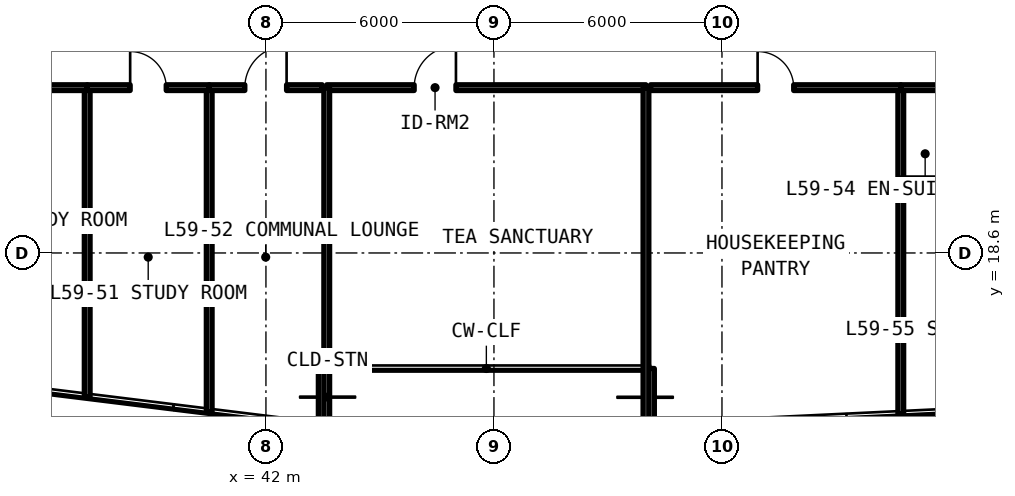
"""IFC4 building model, lengths in metres.
Left out: names, types, materials, properties, quantities, classifications, styles, units other than length and angle.
Written with IfcOpenShell. Run it as: python <this file> out.ifc"""

import sys

from ifc_helpers import new_model, si_unit, direction, frame, frame_2d, origin, place, context, subcontext, project, spatial, rectangle, extrude, element, fill, save


model = new_model("IFC4")
c1 = context("Model", 3, precision=1e-05, world=origin(), true_north=direction((0.0, 1.0)))
c2 = subcontext(c1, "Body", "Model", "MODEL_VIEW")
j1 = project(units=[si_unit("LENGTHUNIT", "METRE"), si_unit("PLANEANGLEUNIT", "RADIAN")], contexts=[c1])
p1 = place(None, origin())
s1 = spatial("IfcSite", under=j1, at=p1, CompositionType="ELEMENT")
p2 = place(p1, origin())
s2 = spatial("IfcBuilding", under=s1, at=p2, CompositionType="ELEMENT")
p3 = place(p2, frame((0.0, 0.0, 211.86)))
s3 = spatial("IfcBuildingStorey", under=s2, at=p3, CompositionType="ELEMENT", Elevation=211.86)
p4 = place(p3, frame((43.49, 14.054, 0.0), z_axis=(0.0, 0.0, 1.0), x_axis=(0.0, 1.0, 0.0)))
e1 = element("IfcWall", 1, at=p4, inside=s3, PredefinedType="SOLIDWALL", context=c2, shape_type="SweptSolid", body=[
    extrude(rectangle(XDim=1.506, YDim=0.22, at=frame_2d((0.753, 0.0))), origin(), (0.0, 0.0, 1.0), 3.41),
])
p5 = place(p3, frame((52.11, 15.56, 0.0), z_axis=(0.0, 0.0, 1.0), x_axis=(0.0, -1.0, 0.0)))
e2 = element("IfcWall", 2, at=p5, inside=s3, PredefinedType="SOLIDWALL", context=c2, shape_type="SweptSolid", body=[
    extrude(rectangle(XDim=1.515, YDim=0.22, at=frame_2d((0.757, 0.0))), origin(), (0.0, 0.0, 1.0), 3.41),
])
p6 = place(p3, frame((43.6, 22.95, 0.0), z_axis=(0.0, 0.0, 1.0), x_axis=(1.0, 0.0, 0.0)))
e3 = element("IfcWall", 3, at=p6, inside=s3, PredefinedType="SOLIDWALL", context=c2, shape_type="SweptSolid", body=[
    extrude(rectangle(XDim=8.4, YDim=0.15, at=frame_2d((4.2, 0.0))), origin(), (0.0, 0.0, 1.0), 2.63),
])
p7 = place(p6, frame((2.3, 0.0, 0.0)))
e4 = element("IfcOpeningElement", 4, at=p7, cuts=e3, PredefinedType="OPENING", context=c2, shape_type="SweptSolid", body=[
    extrude(rectangle(XDim=1.1, YDim=2.15, at=frame_2d((0.55, 1.075))), frame((0.0, 0.085, 0.0), z_axis=(0.0, -1.0, 0.0), x_axis=(1.0, 0.0, 0.0)), (0.0, 0.0, 1.0), 0.17),
])
p8 = place(p3, frame((43.6, 14.056, 0.0), z_axis=(0.0, 0.0, 1.0), x_axis=(0.0, 1.0, 0.0)))
e5 = element("IfcWall", 5, at=p8, inside=s3, PredefinedType="SOLIDWALL", context=c2, shape_type="SweptSolid", body=[
    extrude(rectangle(XDim=8.894, YDim=0.15, at=frame_2d((4.447, 0.0))), origin(), (0.0, 0.0, 1.0), 2.63),
])
p9 = place(p3, frame((52.0, 14.046, 0.0), z_axis=(0.0, 0.0, 1.0), x_axis=(0.0, 1.0, 0.0)))
e6 = element("IfcWall", 6, at=p9, inside=s3, PredefinedType="SOLIDWALL", context=c2, shape_type="SweptSolid", body=[
    extrude(rectangle(XDim=8.904, YDim=0.15, at=frame_2d((4.452, 0.0))), origin(), (0.0, 0.0, 1.0), 2.63),
])
p10 = place(p3, frame((37.297, 14.819, 0.0), z_axis=(0.0, 0.0, 1.0), x_axis=(0.0, 1.0, 0.0)))
e7 = element("IfcWall", 7, at=p10, inside=s3, PredefinedType="SOLIDWALL", context=c2, shape_type="SweptSolid", body=[
    extrude(rectangle(XDim=8.131, YDim=0.15, at=frame_2d((4.065, 0.0))), origin(), (0.0, 0.0, 1.0), 2.63),
])
p11 = place(p3, frame((34.205, 22.95, 0.0), z_axis=(0.0, 0.0, 1.0), x_axis=(1.0, 0.0, 0.0)))
e8 = element("IfcWall", 8, at=p11, inside=s3, PredefinedType="SOLIDWALL", context=c2, shape_type="SweptSolid", body=[
    extrude(rectangle(XDim=3.092, YDim=0.15, at=frame_2d((1.546, 0.0))), origin(), (0.0, 0.0, 1.0), 2.63),
])
p12 = place(p11, frame((1.071, 0.0, 0.0)))
e9 = element("IfcOpeningElement", 9, at=p12, cuts=e8, PredefinedType="OPENING", context=c2, shape_type="SweptSolid", body=[
    extrude(rectangle(XDim=0.95, YDim=2.15, at=frame_2d((0.475, 1.075))), frame((0.0, 0.085, 0.0), z_axis=(0.0, -1.0, 0.0), x_axis=(1.0, 0.0, 0.0)), (0.0, 0.0, 1.0), 0.17),
])
p13 = place(p3, frame((40.507, 14.423, 0.0), z_axis=(0.0, 0.0, 1.0), x_axis=(0.0, 1.0, 0.0)))
e10 = element("IfcWall", 10, at=p13, inside=s3, PredefinedType="SOLIDWALL", context=c2, shape_type="SweptSolid", body=[
    extrude(rectangle(XDim=8.527, YDim=0.15, at=frame_2d((4.264, 0.0))), origin(), (0.0, 0.0, 1.0), 2.63),
])
p14 = place(p3, frame((37.297, 22.95, 0.0), z_axis=(0.0, 0.0, 1.0), x_axis=(1.0, 0.0, 0.0)))
e11 = element("IfcWall", 11, at=p14, inside=s3, PredefinedType="SOLIDWALL", context=c2, shape_type="SweptSolid", body=[
    extrude(rectangle(XDim=3.21, YDim=0.15, at=frame_2d((1.605, 0.0))), origin(), (0.0, 0.0, 1.0), 2.63),
])
p15 = place(p14, frame((1.13, 0.0, 0.0)))
e12 = element("IfcOpeningElement", 12, at=p15, cuts=e11, PredefinedType="OPENING", context=c2, shape_type="SweptSolid", body=[
    extrude(rectangle(XDim=0.95, YDim=2.15, at=frame_2d((0.475, 1.075))), frame((0.0, 0.085, 0.0), z_axis=(0.0, -1.0, 0.0), x_axis=(1.0, 0.0, 0.0)), (0.0, 0.0, 1.0), 0.17),
])
p16 = place(p3, frame((40.507, 22.95, 0.0), z_axis=(0.0, 0.0, 1.0), x_axis=(1.0, 0.0, 0.0)))
e13 = element("IfcWall", 13, at=p16, inside=s3, PredefinedType="SOLIDWALL", context=c2, shape_type="SweptSolid", body=[
    extrude(rectangle(XDim=2.973, YDim=0.15, at=frame_2d((1.486, 0.0))), origin(), (0.0, 0.0, 1.0), 2.63),
])
p17 = place(p16, frame((0.936, 0.0, 0.0)))
e14 = element("IfcOpeningElement", 14, at=p17, cuts=e13, PredefinedType="OPENING", context=c2, shape_type="SweptSolid", body=[
    extrude(rectangle(XDim=1.1, YDim=2.15, at=frame_2d((0.55, 1.075))), frame((0.0, 0.085, 0.0), z_axis=(0.0, -1.0, 0.0), x_axis=(1.0, 0.0, 0.0)), (0.0, 0.0, 1.0), 0.17),
])
p18 = place(p3, frame((58.706, 14.361, 0.0), z_axis=(0.0, 0.0, 1.0), x_axis=(0.0, 1.0, 0.0)))
e15 = element("IfcWall", 15, at=p18, inside=s3, PredefinedType="SOLIDWALL", context=c2, shape_type="SweptSolid", body=[
    extrude(rectangle(XDim=8.589, YDim=0.15, at=frame_2d((4.294, 0.0))), origin(), (0.0, 0.0, 1.0), 2.63),
])
p19 = place(p3, frame((52.12, 22.95, 0.0), z_axis=(0.0, 0.0, 1.0), x_axis=(1.0, 0.0, 0.0)))
e16 = element("IfcWall", 16, at=p19, inside=s3, PredefinedType="SOLIDWALL", context=c2, shape_type="SweptSolid", body=[
    extrude(rectangle(XDim=6.585, YDim=0.15, at=frame_2d((3.293, 0.0))), origin(), (0.0, 0.0, 1.0), 2.63),
])
p20 = place(p19, frame((2.818, 0.0, 0.0)))
e17 = element("IfcOpeningElement", 17, at=p20, cuts=e16, PredefinedType="OPENING", context=c2, shape_type="SweptSolid", body=[
    extrude(rectangle(XDim=0.95, YDim=2.15, at=frame_2d((0.475, 1.075))), frame((0.0, 0.085, 0.0), z_axis=(0.0, -1.0, 0.0), x_axis=(1.0, 0.0, 0.0)), (0.0, 0.0, 1.0), 0.17),
])
p21 = place(p3, frame((58.706, 20.5, 0.0), z_axis=(0.0, 0.0, 1.0), x_axis=(1.0, 0.0, 0.0)))
e18 = element("IfcWall", 18, at=p21, inside=s3, PredefinedType="PARTITIONING", context=c2, shape_type="SweptSolid", body=[
    extrude(rectangle(XDim=2.35, YDim=0.15, at=frame_2d((1.175, 0.0))), origin(), (0.0, 0.0, 1.0), 2.63),
])
p22 = place(p3, frame((58.706, 22.95, 0.0), z_axis=(0.0, 0.0, 1.0), x_axis=(1.0, 0.0, 0.0)))
e19 = element("IfcWall", 19, at=p22, inside=s3, PredefinedType="SOLIDWALL", context=c2, shape_type="SweptSolid", body=[
    extrude(rectangle(XDim=7.409, YDim=0.15, at=frame_2d((3.704, 0.0))), origin(), (0.0, 0.0, 1.0), 2.63),
])
p23 = place(p22, frame((4.444, 0.0, 0.0)))
e20 = element("IfcOpeningElement", 20, at=p23, cuts=e19, PredefinedType="OPENING", context=c2, shape_type="SweptSolid", body=[
    extrude(rectangle(XDim=0.95, YDim=2.15, at=frame_2d((0.475, 1.075))), frame((0.0, 0.085, 0.0), z_axis=(0.0, -1.0, 0.0), x_axis=(1.0, 0.0, 0.0)), (0.0, 0.0, 1.0), 0.17),
])
p24 = place(p7, origin())
e21 = element("IfcDoor", 21, at=p24, inside=s3, OperationType="SINGLE_SWING_RIGHT", PredefinedType="DOOR", context=c2, shape_type="SweptSolid", body=[
    extrude(rectangle(XDim=1.1, YDim=2.15, at=frame_2d((0.55, 1.075))), frame((0.0, 0.025, 0.0), z_axis=(0.0, -1.0, 0.0), x_axis=(1.0, 0.0, 0.0)), (0.0, 0.0, 1.0), 0.05),
])
fill(e4, e21)
p25 = place(p15, origin())
e22 = element("IfcDoor", 22, at=p25, inside=s3, OperationType="SINGLE_SWING_LEFT", PredefinedType="DOOR", context=c2, shape_type="SweptSolid", body=[
    extrude(rectangle(XDim=0.95, YDim=2.15, at=frame_2d((0.475, 1.075))), frame((0.0, 0.025, 0.0), z_axis=(0.0, -1.0, 0.0), x_axis=(1.0, 0.0, 0.0)), (0.0, 0.0, 1.0), 0.05),
])
fill(e12, e22)
p26 = place(p17, origin())
e23 = element("IfcDoor", 23, at=p26, inside=s3, OperationType="SINGLE_SWING_RIGHT", PredefinedType="DOOR", context=c2, shape_type="SweptSolid", body=[
    extrude(rectangle(XDim=1.1, YDim=2.15, at=frame_2d((0.55, 1.075))), frame((0.0, 0.025, 0.0), z_axis=(0.0, -1.0, 0.0), x_axis=(1.0, 0.0, 0.0)), (0.0, 0.0, 1.0), 0.05),
])
fill(e14, e23)
p27 = place(p20, origin())
e24 = element("IfcDoor", 24, at=p27, inside=s3, OperationType="SINGLE_SWING_LEFT", PredefinedType="DOOR", context=c2, shape_type="SweptSolid", body=[
    extrude(rectangle(XDim=0.95, YDim=2.15, at=frame_2d((0.475, 1.075))), frame((0.0, 0.025, 0.0), z_axis=(0.0, -1.0, 0.0), x_axis=(1.0, 0.0, 0.0)), (0.0, 0.0, 1.0), 0.05),
])
fill(e17, e24)
save(model, sys.argv[1])
